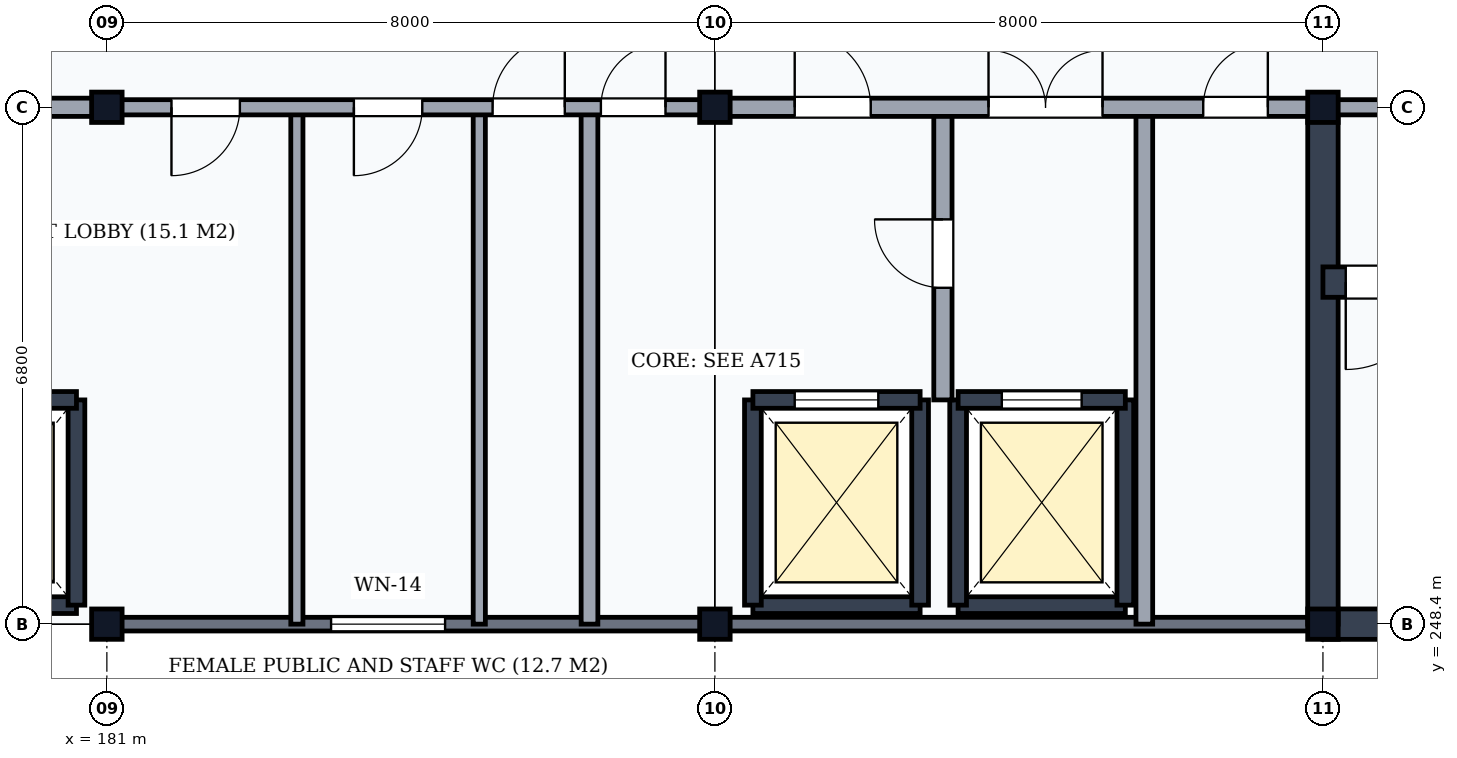
"""IFC4 building model, lengths in metres.
Left out: names, types, materials, properties, quantities, classifications, styles, units other than length and angle.
Written with IfcOpenShell. Run it as: python <this file> out.ifc"""

import sys

from ifc_helpers import new_model, si_unit, direction, frame, frame_2d, origin, origin_2d, place, context, subcontext, project, spatial, rectangle, i_section, extrude, element, fill, save


model = new_model("IFC4")
c1 = context("Model", 3, precision=1e-05, world=origin(), true_north=direction((0.0, 1.0)))
c2 = subcontext(c1, "Body", "Model", "MODEL_VIEW")
j1 = project(units=[si_unit("LENGTHUNIT", "METRE"), si_unit("PLANEANGLEUNIT", "RADIAN")], contexts=[c1])
p1 = place(None, origin())
s1 = spatial("IfcSite", under=j1, at=p1, CompositionType="ELEMENT")
p2 = place(p1, origin())
s2 = spatial("IfcBuilding", under=s1, at=p2, CompositionType="ELEMENT")
p3 = place(p2, frame((0.0, 0.0, 20.4)))
s3 = spatial("IfcBuildingStorey", under=s2, at=p3, CompositionType="ELEMENT", Elevation=20.4)
for number, where, z_axis, x_axis in (
    (1, (181.0, 248.4, 0.0), (0.0, 0.0, 1.0), (1.0, 0.0, 0.0)),
    (2, (181.0, 255.2, 0.0), (0.0, 0.0, 1.0), (1.0, 0.0, 0.0)),
    (3, (189.0, 248.4, 0.0), (0.0, 0.0, 1.0), (1.0, 0.0, 0.0)),
    (4, (189.0, 255.2, 0.0), (0.0, 0.0, 1.0), (1.0, 0.0, 0.0)),
    (5, (197.0, 248.4, 0.0), (0.0, 0.0, 1.0), (1.0, 0.0, 0.0)),
    (6, (197.0, 255.2, 0.0), (0.0, 0.0, 1.0), (1.0, 0.0, 0.0)),
):
    element("IfcColumn", number, at=place(p3, frame(where, z_axis=z_axis, x_axis=x_axis)), inside=s3, PredefinedType="COLUMN", context=c2, shape_type="SweptSolid", body=[
        extrude(i_section(OverallWidth=0.401, OverallDepth=0.399, WebThickness=0.025, FlangeThickness=0.04, FilletRadius=0.015, at=origin_2d()), origin(), (0.0, 0.0, 1.0), 3.9),
    ])
p4 = place(p3, frame((181.006, 248.4, 0.0), z_axis=(0.0, 0.0, 1.0), x_axis=(1.0, 0.0, 0.0)))
e7 = element("IfcWall", 7, at=p4, inside=s3, PredefinedType="SOLIDWALL", context=c2, shape_type="SweptSolid", body=[
    extrude(rectangle(XDim=7.988, YDim=0.18, at=frame_2d((3.994, 0.0))), origin(), (0.0, 0.0, 1.0), 3.348),
])
p5 = place(p4, frame((2.944, 0.0, 0.95)))
e8 = element("IfcOpeningElement", 8, at=p5, cuts=e7, PredefinedType="OPENING", context=c2, shape_type="SweptSolid", body=[
    extrude(rectangle(XDim=1.5, YDim=1.9, at=frame_2d((0.75, 0.95))), frame((0.0, 0.105, 0.0), z_axis=(0.0, -1.0, 0.0), x_axis=(1.0, 0.0, 0.0)), (0.0, 0.0, 1.0), 0.21),
])
p6 = place(p3, frame((189.006, 248.4, 0.0), z_axis=(0.0, 0.0, 1.0), x_axis=(1.0, 0.0, 0.0)))
e9 = element("IfcWall", 9, at=p6, inside=s3, PredefinedType="SOLIDWALL", context=c2, shape_type="SweptSolid", body=[
    extrude(rectangle(XDim=7.988, YDim=0.18, at=frame_2d((3.994, 0.0))), origin(), (0.0, 0.0, 1.0), 3.348),
])
p7 = place(p3, frame((197.0, 248.4, 0.0), z_axis=(0.0, 0.0, 1.0), x_axis=(1.0, 0.0, 0.0)))
e10 = element("IfcWall", 10, at=p7, inside=s3, PredefinedType="SHEAR", context=c2, shape_type="SweptSolid", body=[
    extrude(rectangle(XDim=8.0, YDim=0.4, at=frame_2d((4.0, 0.0))), origin(), (0.0, 0.0, 1.0), 3.66),
])
p8 = place(p3, frame((197.0, 248.4, 0.0), z_axis=(0.0, 0.0, 1.0), x_axis=(0.0, 1.0, 0.0)))
e11 = element("IfcWall", 11, at=p8, inside=s3, PredefinedType="SHEAR", context=c2, shape_type="SweptSolid", body=[
    extrude(rectangle(XDim=6.8, YDim=0.4, at=frame_2d((3.4, 0.0))), origin(), (0.0, 0.0, 1.0), 3.66),
])
p9 = place(p3, frame((197.0, 252.9, 0.0), z_axis=(0.0, 0.0, 1.0), x_axis=(1.0, 0.0, 0.0)))
e12 = element("IfcWall", 12, at=p9, inside=s3, PredefinedType="SHEAR", context=c2, shape_type="SweptSolid", body=[
    extrude(rectangle(XDim=8.0, YDim=0.4, at=frame_2d((4.0, 0.0))), origin(), (0.0, 0.0, 1.0), 3.66),
])
p10 = place(p9, frame((0.3, 0.0, 0.0)))
e13 = element("IfcOpeningElement", 13, at=p10, cuts=e12, PredefinedType="OPENING", context=c2, shape_type="SweptSolid", body=[
    extrude(rectangle(XDim=1.15, YDim=2.15, at=frame_2d((0.575, 1.075))), frame((0.0, 0.215, 0.0), z_axis=(0.0, -1.0, 0.0), x_axis=(1.0, 0.0, 0.0)), (0.0, 0.0, 1.0), 0.43),
])
p11 = place(p3, frame((197.0, 255.2, 0.0), z_axis=(0.0, 0.0, 1.0), x_axis=(1.0, 0.0, 0.0)))
e14 = element("IfcWall", 14, at=p11, inside=s3, PredefinedType="PARTITIONING", context=c2, shape_type="SweptSolid", body=[
    extrude(rectangle(XDim=8.0, YDim=0.2, at=frame_2d((4.0, 0.0))), origin(), (0.0, 0.0, 1.0), 3.058),
])
p12 = place(p11, frame((3.275, 0.0, 0.0)))
e15 = element("IfcOpeningElement", 15, at=p12, cuts=e14, PredefinedType="OPENING", context=c2, shape_type="SweptSolid", body=[
    extrude(rectangle(XDim=1.45, YDim=2.2, at=frame_2d((0.725, 1.1))), frame((0.0, 0.115, 0.0), z_axis=(0.0, -1.0, 0.0), x_axis=(1.0, 0.0, 0.0)), (0.0, 0.0, 1.0), 0.23),
])
p13 = place(p3, frame((178.4, 248.65, 0.0), z_axis=(0.0, 0.0, 1.0), x_axis=(1.0, 0.0, 0.0)))
e16 = element("IfcWall", 16, at=p13, inside=s3, PredefinedType="SHEAR", context=c2, shape_type="SweptSolid", body=[
    extrude(rectangle(XDim=2.2, YDim=0.22, at=frame_2d((1.1, 0.0))), origin(), (0.0, 0.0, 1.0), 3.66),
])
p14 = place(p3, frame((180.6, 248.65, 0.0), z_axis=(0.0, 0.0, 1.0), x_axis=(0.0, 1.0, 0.0)))
e17 = element("IfcWall", 17, at=p14, inside=s3, PredefinedType="SHEAR", context=c2, shape_type="SweptSolid", body=[
    extrude(rectangle(XDim=2.7, YDim=0.22, at=frame_2d((1.35, 0.0))), origin(), (0.0, 0.0, 1.0), 3.66),
])
p15 = place(p3, frame((178.4, 251.35, 0.0), z_axis=(0.0, 0.0, 1.0), x_axis=(1.0, 0.0, 0.0)))
e18 = element("IfcWall", 18, at=p15, inside=s3, PredefinedType="SHEAR", context=c2, shape_type="SweptSolid", body=[
    extrude(rectangle(XDim=2.2, YDim=0.22, at=frame_2d((1.1, 0.0))), origin(), (0.0, 0.0, 1.0), 3.66),
])
p16 = place(p15, frame((0.575, 0.0, 0.0)))
e19 = element("IfcOpeningElement", 19, at=p16, cuts=e18, PredefinedType="OPENING", context=c2, shape_type="SweptSolid", body=[
    extrude(rectangle(XDim=1.05, YDim=2.15, at=frame_2d((0.525, 1.075))), frame((0.0, 0.125, 0.0), z_axis=(0.0, -1.0, 0.0), x_axis=(1.0, 0.0, 0.0)), (0.0, 0.0, 1.0), 0.25),
])
p17 = place(p3, frame((189.5, 248.65, 0.0), z_axis=(0.0, 0.0, 1.0), x_axis=(1.0, 0.0, 0.0)))
e20 = element("IfcWall", 20, at=p17, inside=s3, PredefinedType="SHEAR", context=c2, shape_type="SweptSolid", body=[
    extrude(rectangle(XDim=2.2, YDim=0.22, at=frame_2d((1.1, 0.0))), origin(), (0.0, 0.0, 1.0), 3.66),
])
for number, where, z_axis, x_axis in (
    (21, (189.5, 248.65, 0.0), (0.0, 0.0, 1.0), (0.0, 1.0, 0.0)),
    (22, (191.7, 248.65, 0.0), (0.0, 0.0, 1.0), (0.0, 1.0, 0.0)),
):
    element("IfcWall", number, at=place(p3, frame(where, z_axis=z_axis, x_axis=x_axis)), inside=s3, PredefinedType="SHEAR", context=c2, shape_type="SweptSolid", body=[
        extrude(rectangle(XDim=2.7, YDim=0.22, at=frame_2d((1.35, 0.0))), origin(), (0.0, 0.0, 1.0), 3.66),
    ])
p18 = place(p3, frame((189.5, 251.35, 0.0), z_axis=(0.0, 0.0, 1.0), x_axis=(1.0, 0.0, 0.0)))
e23 = element("IfcWall", 23, at=p18, inside=s3, PredefinedType="SHEAR", context=c2, shape_type="SweptSolid", body=[
    extrude(rectangle(XDim=2.2, YDim=0.22, at=frame_2d((1.1, 0.0))), origin(), (0.0, 0.0, 1.0), 3.66),
])
p19 = place(p18, frame((0.55, 0.0, 0.0)))
e24 = element("IfcOpeningElement", 24, at=p19, cuts=e23, PredefinedType="OPENING", context=c2, shape_type="SweptSolid", body=[
    extrude(rectangle(XDim=1.1, YDim=2.15, at=frame_2d((0.55, 1.075))), frame((0.0, 0.125, 0.0), z_axis=(0.0, -1.0, 0.0), x_axis=(1.0, 0.0, 0.0)), (0.0, 0.0, 1.0), 0.25),
])
p20 = place(p3, frame((192.2, 248.65, 0.0), z_axis=(0.0, 0.0, 1.0), x_axis=(1.0, 0.0, 0.0)))
e25 = element("IfcWall", 25, at=p20, inside=s3, PredefinedType="SHEAR", context=c2, shape_type="SweptSolid", body=[
    extrude(rectangle(XDim=2.2, YDim=0.22, at=frame_2d((1.1, 0.0))), origin(), (0.0, 0.0, 1.0), 3.66),
])
for number, where, z_axis, x_axis in (
    (26, (192.2, 248.65, 0.0), (0.0, 0.0, 1.0), (0.0, 1.0, 0.0)),
    (27, (194.4, 248.65, 0.0), (0.0, 0.0, 1.0), (0.0, 1.0, 0.0)),
):
    element("IfcWall", number, at=place(p3, frame(where, z_axis=z_axis, x_axis=x_axis)), inside=s3, PredefinedType="SHEAR", context=c2, shape_type="SweptSolid", body=[
        extrude(rectangle(XDim=2.7, YDim=0.22, at=frame_2d((1.35, 0.0))), origin(), (0.0, 0.0, 1.0), 3.66),
    ])
p21 = place(p3, frame((192.2, 251.35, 0.0), z_axis=(0.0, 0.0, 1.0), x_axis=(1.0, 0.0, 0.0)))
e28 = element("IfcWall", 28, at=p21, inside=s3, PredefinedType="SHEAR", context=c2, shape_type="SweptSolid", body=[
    extrude(rectangle(XDim=2.2, YDim=0.22, at=frame_2d((1.1, 0.0))), origin(), (0.0, 0.0, 1.0), 3.66),
])
p22 = place(p21, frame((0.575, 0.0, 0.0)))
e29 = element("IfcOpeningElement", 29, at=p22, cuts=e28, PredefinedType="OPENING", context=c2, shape_type="SweptSolid", body=[
    extrude(rectangle(XDim=1.05, YDim=2.15, at=frame_2d((0.525, 1.075))), frame((0.0, 0.125, 0.0), z_axis=(0.0, -1.0, 0.0), x_axis=(1.0, 0.0, 0.0)), (0.0, 0.0, 1.0), 0.25),
])
p23 = place(p3, frame((192.0, 251.35, 0.0), z_axis=(0.0, 0.0, 1.0), x_axis=(0.0, 1.0, 0.0)))
e30 = element("IfcWall", 30, at=p23, inside=s3, PredefinedType="PARTITIONING", context=c2, shape_type="SweptSolid", body=[
    extrude(rectangle(XDim=3.85, YDim=0.24, at=frame_2d((1.925, 0.0))), origin(), (0.0, 0.0, 1.0), 3.66),
])
p24 = place(p23, frame((1.475, 0.0, 0.0)))
e31 = element("IfcOpeningElement", 31, at=p24, cuts=e30, PredefinedType="OPENING", context=c2, shape_type="SweptSolid", body=[
    extrude(rectangle(XDim=0.9, YDim=2.1, at=frame_2d((0.45, 1.05))), frame((0.0, 0.135, 0.0), z_axis=(0.0, -1.0, 0.0), x_axis=(1.0, 0.0, 0.0)), (0.0, 0.0, 1.0), 0.27),
])
p25 = place(p3, frame((194.65, 248.4, 0.0), z_axis=(0.0, 0.0, 1.0), x_axis=(0.0, 1.0, 0.0)))
e32 = element("IfcWall", 32, at=p25, inside=s3, PredefinedType="PARTITIONING", context=c2, shape_type="SweptSolid", body=[
    extrude(rectangle(XDim=6.8, YDim=0.22, at=frame_2d((3.4, 0.0))), origin(), (0.0, 0.0, 1.0), 3.66),
])
for number, where, z_axis, x_axis in (
    (33, (183.5, 248.4, 0.0), (0.0, 0.0, 1.0), (0.0, 1.0, 0.0)),
    (34, (185.9, 248.4, 0.0), (0.0, 0.0, 1.0), (0.0, 1.0, 0.0)),
):
    element("IfcWall", number, at=place(p3, frame(where, z_axis=z_axis, x_axis=x_axis)), inside=s3, PredefinedType="PARTITIONING", context=c2, shape_type="SweptSolid", body=[
        extrude(rectangle(XDim=6.8, YDim=0.16, at=frame_2d((3.4, 0.0))), origin(), (0.0, 0.0, 1.0), 3.66),
    ])
p26 = place(p3, frame((187.35, 248.4, 0.0), z_axis=(0.0, 0.0, 1.0), x_axis=(0.0, 1.0, 0.0)))
e35 = element("IfcWall", 35, at=p26, inside=s3, PredefinedType="PARTITIONING", context=c2, shape_type="SweptSolid", body=[
    extrude(rectangle(XDim=6.8, YDim=0.22, at=frame_2d((3.4, 0.0))), origin(), (0.0, 0.0, 1.0), 3.66),
])
p27 = place(p3, frame((173.0, 255.2, 0.0), z_axis=(0.0, 0.0, 1.0), x_axis=(1.0, 0.0, 0.0)))
e36 = element("IfcWall", 36, at=p27, inside=s3, PredefinedType="PARTITIONING", context=c2, shape_type="SweptSolid", body=[
    extrude(rectangle(XDim=8.0, YDim=0.24, at=frame_2d((4.0, 0.0))), origin(), (0.0, 0.0, 1.0), 3.058),
])
p28 = place(p27, frame((1.05, 0.0, 0.0)))
e37 = element("IfcOpeningElement", 37, at=p28, cuts=e36, PredefinedType="OPENING", context=c2, shape_type="SweptSolid", body=[
    extrude(rectangle(XDim=1.0, YDim=2.1, at=frame_2d((0.5, 1.05))), frame((0.0, 0.135, 0.0), z_axis=(0.0, -1.0, 0.0), x_axis=(1.0, 0.0, 0.0)), (0.0, 0.0, 1.0), 0.27),
])
p29 = place(p27, frame((4.6, 0.0, 0.0)))
e38 = element("IfcOpeningElement", 38, at=p29, cuts=e36, PredefinedType="OPENING", context=c2, shape_type="SweptSolid", body=[
    extrude(rectangle(XDim=1.6, YDim=2.25, at=frame_2d((0.8, 1.125))), frame((0.0, 0.135, 0.0), z_axis=(0.0, -1.0, 0.0), x_axis=(1.0, 0.0, 0.0)), (0.0, 0.0, 1.0), 0.27),
])
p30 = place(p3, frame((181.0, 255.2, 0.0), z_axis=(0.0, 0.0, 1.0), x_axis=(1.0, 0.0, 0.0)))
e39 = element("IfcWall", 39, at=p30, inside=s3, PredefinedType="PARTITIONING", context=c2, shape_type="SweptSolid", body=[
    extrude(rectangle(XDim=8.0, YDim=0.2, at=frame_2d((4.0, 0.0))), origin(), (0.0, 0.0, 1.0), 3.058),
])
p31 = place(p30, frame((0.85, 0.0, 0.0)))
e40 = element("IfcOpeningElement", 40, at=p31, cuts=e39, PredefinedType="OPENING", context=c2, shape_type="SweptSolid", body=[
    extrude(rectangle(XDim=0.9, YDim=2.1, at=frame_2d((0.45, 1.05))), frame((0.0, 0.115, 0.0), z_axis=(0.0, -1.0, 0.0), x_axis=(1.0, 0.0, 0.0)), (0.0, 0.0, 1.0), 0.23),
])
p32 = place(p30, frame((3.25, 0.0, 0.0)))
e41 = element("IfcOpeningElement", 41, at=p32, cuts=e39, PredefinedType="OPENING", context=c2, shape_type="SweptSolid", body=[
    extrude(rectangle(XDim=0.9, YDim=2.1, at=frame_2d((0.45, 1.05))), frame((0.0, 0.115, 0.0), z_axis=(0.0, -1.0, 0.0), x_axis=(1.0, 0.0, 0.0)), (0.0, 0.0, 1.0), 0.23),
])
p33 = place(p30, frame((5.075, 0.0, 0.0)))
e42 = element("IfcOpeningElement", 42, at=p33, cuts=e39, PredefinedType="OPENING", context=c2, shape_type="SweptSolid", body=[
    extrude(rectangle(XDim=0.95, YDim=2.1, at=frame_2d((0.475, 1.05))), frame((0.0, 0.115, 0.0), z_axis=(0.0, -1.0, 0.0), x_axis=(1.0, 0.0, 0.0)), (0.0, 0.0, 1.0), 0.23),
])
p34 = place(p30, frame((6.5, 0.0, 0.0)))
e43 = element("IfcOpeningElement", 43, at=p34, cuts=e39, PredefinedType="OPENING", context=c2, shape_type="SweptSolid", body=[
    extrude(rectangle(XDim=0.85, YDim=2.1, at=frame_2d((0.425, 1.05))), frame((0.0, 0.115, 0.0), z_axis=(0.0, -1.0, 0.0), x_axis=(1.0, 0.0, 0.0)), (0.0, 0.0, 1.0), 0.23),
])
p35 = place(p3, frame((189.0, 255.2, 0.0), z_axis=(0.0, 0.0, 1.0), x_axis=(1.0, 0.0, 0.0)))
e44 = element("IfcWall", 44, at=p35, inside=s3, PredefinedType="PARTITIONING", context=c2, shape_type="SweptSolid", body=[
    extrude(rectangle(XDim=8.0, YDim=0.24, at=frame_2d((4.0, 0.0))), origin(), (0.0, 0.0, 1.0), 3.058),
])
p36 = place(p35, frame((1.05, 0.0, 0.0)))
e45 = element("IfcOpeningElement", 45, at=p36, cuts=e44, PredefinedType="OPENING", context=c2, shape_type="SweptSolid", body=[
    extrude(rectangle(XDim=1.0, YDim=2.1, at=frame_2d((0.5, 1.05))), frame((0.0, 0.135, 0.0), z_axis=(0.0, -1.0, 0.0), x_axis=(1.0, 0.0, 0.0)), (0.0, 0.0, 1.0), 0.27),
])
p37 = place(p35, frame((3.6, 0.0, 0.0)))
e46 = element("IfcOpeningElement", 46, at=p37, cuts=e44, PredefinedType="OPENING", context=c2, shape_type="SweptSolid", body=[
    extrude(rectangle(XDim=1.5, YDim=2.25, at=frame_2d((0.75, 1.125))), frame((0.0, 0.135, 0.0), z_axis=(0.0, -1.0, 0.0), x_axis=(1.0, 0.0, 0.0)), (0.0, 0.0, 1.0), 0.27),
])
p38 = place(p35, frame((6.425, 0.0, 0.0)))
e47 = element("IfcOpeningElement", 47, at=p38, cuts=e44, PredefinedType="OPENING", context=c2, shape_type="SweptSolid", body=[
    extrude(rectangle(XDim=0.85, YDim=2.1, at=frame_2d((0.425, 1.05))), frame((0.0, 0.135, 0.0), z_axis=(0.0, -1.0, 0.0), x_axis=(1.0, 0.0, 0.0)), (0.0, 0.0, 1.0), 0.27),
])
p39 = place(p5, origin())
e48 = element("IfcWindow", 48, at=p39, inside=s3, PartitioningType="SINGLE_PANEL", PredefinedType="WINDOW", context=c2, shape_type="SweptSolid", body=[
    extrude(rectangle(XDim=1.5, YDim=1.9, at=frame_2d((0.75, 0.95))), frame((0.0, 0.03, 0.0), z_axis=(0.0, -1.0, 0.0), x_axis=(1.0, 0.0, 0.0)), (0.0, 0.0, 1.0), 0.06),
])
fill(e8, e48)
p40 = place(p10, frame((1.15, 0.0, 0.0), z_axis=(0.0, 0.0, 1.0), x_axis=(-1.0, 0.0, 0.0)))
e49 = element("IfcDoor", 49, at=p40, inside=s3, OperationType="SINGLE_SWING_RIGHT", PredefinedType="DOOR", context=c2, shape_type="SweptSolid", body=[
    extrude(rectangle(XDim=1.15, YDim=2.15, at=frame_2d((0.575, 1.075))), frame((0.0, 0.025, 0.0), z_axis=(0.0, -1.0, 0.0), x_axis=(1.0, 0.0, 0.0)), (0.0, 0.0, 1.0), 0.05),
])
fill(e13, e49)
p41 = place(p19, origin())
e50 = element("IfcDoor", 50, at=p41, inside=s3, OperationType="DOUBLE_DOOR_SLIDING", PredefinedType="USERDEFINED", context=c2, shape_type="SweptSolid", body=[
    extrude(rectangle(XDim=1.1, YDim=2.15, at=frame_2d((0.55, 1.075))), frame((0.0, 0.025, 0.0), z_axis=(0.0, -1.0, 0.0), x_axis=(1.0, 0.0, 0.0)), (0.0, 0.0, 1.0), 0.05),
])
fill(e24, e50)
p42 = place(p22, origin())
e51 = element("IfcDoor", 51, at=p42, inside=s3, OperationType="DOUBLE_DOOR_SLIDING", PredefinedType="USERDEFINED", context=c2, shape_type="SweptSolid", body=[
    extrude(rectangle(XDim=1.05, YDim=2.15, at=frame_2d((0.525, 1.075))), frame((0.0, 0.025, 0.0), z_axis=(0.0, -1.0, 0.0), x_axis=(1.0, 0.0, 0.0)), (0.0, 0.0, 1.0), 0.05),
])
fill(e29, e51)
p43 = place(p24, frame((0.9, 0.0, 0.0), z_axis=(0.0, 0.0, 1.0), x_axis=(-1.0, 0.0, 0.0)))
e52 = element("IfcDoor", 52, at=p43, inside=s3, OperationType="SINGLE_SWING_LEFT", PredefinedType="DOOR", context=c2, shape_type="SweptSolid", body=[
    extrude(rectangle(XDim=0.9, YDim=2.1, at=frame_2d((0.45, 1.05))), frame((0.0, 0.025, 0.0), z_axis=(0.0, -1.0, 0.0), x_axis=(1.0, 0.0, 0.0)), (0.0, 0.0, 1.0), 0.05),
])
fill(e31, e52)
p44 = place(p31, frame((0.9, 0.0, 0.0), z_axis=(0.0, 0.0, 1.0), x_axis=(-1.0, 0.0, 0.0)))
e53 = element("IfcDoor", 53, at=p44, inside=s3, OperationType="SINGLE_SWING_RIGHT", PredefinedType="DOOR", context=c2, shape_type="SweptSolid", body=[
    extrude(rectangle(XDim=0.9, YDim=2.1, at=frame_2d((0.45, 1.05))), frame((0.0, 0.025, 0.0), z_axis=(0.0, -1.0, 0.0), x_axis=(1.0, 0.0, 0.0)), (0.0, 0.0, 1.0), 0.05),
])
fill(e40, e53)
p45 = place(p32, frame((0.9, 0.0, 0.0), z_axis=(0.0, 0.0, 1.0), x_axis=(-1.0, 0.0, 0.0)))
e54 = element("IfcDoor", 54, at=p45, inside=s3, OperationType="SINGLE_SWING_RIGHT", PredefinedType="DOOR", context=c2, shape_type="SweptSolid", body=[
    extrude(rectangle(XDim=0.9, YDim=2.1, at=frame_2d((0.45, 1.05))), frame((0.0, 0.025, 0.0), z_axis=(0.0, -1.0, 0.0), x_axis=(1.0, 0.0, 0.0)), (0.0, 0.0, 1.0), 0.05),
])
fill(e41, e54)
p46 = place(p33, frame((0.95, 0.0, 0.0), z_axis=(0.0, 0.0, 1.0), x_axis=(-1.0, 0.0, 0.0)))
e55 = element("IfcDoor", 55, at=p46, inside=s3, OperationType="SINGLE_SWING_LEFT", PredefinedType="DOOR", context=c2, shape_type="SweptSolid", body=[
    extrude(rectangle(XDim=0.95, YDim=2.1, at=frame_2d((0.475, 1.05))), frame((0.0, 0.025, 0.0), z_axis=(0.0, -1.0, 0.0), x_axis=(1.0, 0.0, 0.0)), (0.0, 0.0, 1.0), 0.05),
])
fill(e42, e55)
p47 = place(p34, frame((0.85, 0.0, 0.0), z_axis=(0.0, 0.0, 1.0), x_axis=(-1.0, 0.0, 0.0)))
e56 = element("IfcDoor", 56, at=p47, inside=s3, OperationType="SINGLE_SWING_LEFT", PredefinedType="DOOR", context=c2, shape_type="SweptSolid", body=[
    extrude(rectangle(XDim=0.85, YDim=2.1, at=frame_2d((0.425, 1.05))), frame((0.0, 0.025, 0.0), z_axis=(0.0, -1.0, 0.0), x_axis=(1.0, 0.0, 0.0)), (0.0, 0.0, 1.0), 0.05),
])
fill(e43, e56)
p48 = place(p36, origin())
e57 = element("IfcDoor", 57, at=p48, inside=s3, OperationType="SINGLE_SWING_LEFT", PredefinedType="DOOR", context=c2, shape_type="SweptSolid", body=[
    extrude(rectangle(XDim=1.0, YDim=2.1, at=frame_2d((0.5, 1.05))), frame((0.0, 0.025, 0.0), z_axis=(0.0, -1.0, 0.0), x_axis=(1.0, 0.0, 0.0)), (0.0, 0.0, 1.0), 0.05),
])
fill(e45, e57)
p49 = place(p37, origin())
e58 = element("IfcDoor", 58, at=p49, inside=s3, OperationType="DOUBLE_DOOR_SINGLE_SWING", PredefinedType="DOOR", context=c2, shape_type="SweptSolid", body=[
    extrude(rectangle(XDim=1.5, YDim=2.25, at=frame_2d((0.75, 1.125))), frame((0.0, 0.025, 0.0), z_axis=(0.0, -1.0, 0.0), x_axis=(1.0, 0.0, 0.0)), (0.0, 0.0, 1.0), 0.05),
])
fill(e46, e58)
p50 = place(p38, frame((0.85, 0.0, 0.0), z_axis=(0.0, 0.0, 1.0), x_axis=(-1.0, 0.0, 0.0)))
e59 = element("IfcDoor", 59, at=p50, inside=s3, OperationType="SINGLE_SWING_LEFT", PredefinedType="DOOR", context=c2, shape_type="SweptSolid", body=[
    extrude(rectangle(XDim=0.85, YDim=2.1, at=frame_2d((0.425, 1.05))), frame((0.0, 0.025, 0.0), z_axis=(0.0, -1.0, 0.0), x_axis=(1.0, 0.0, 0.0)), (0.0, 0.0, 1.0), 0.05),
])
fill(e47, e59)
save(model, sys.argv[1])
